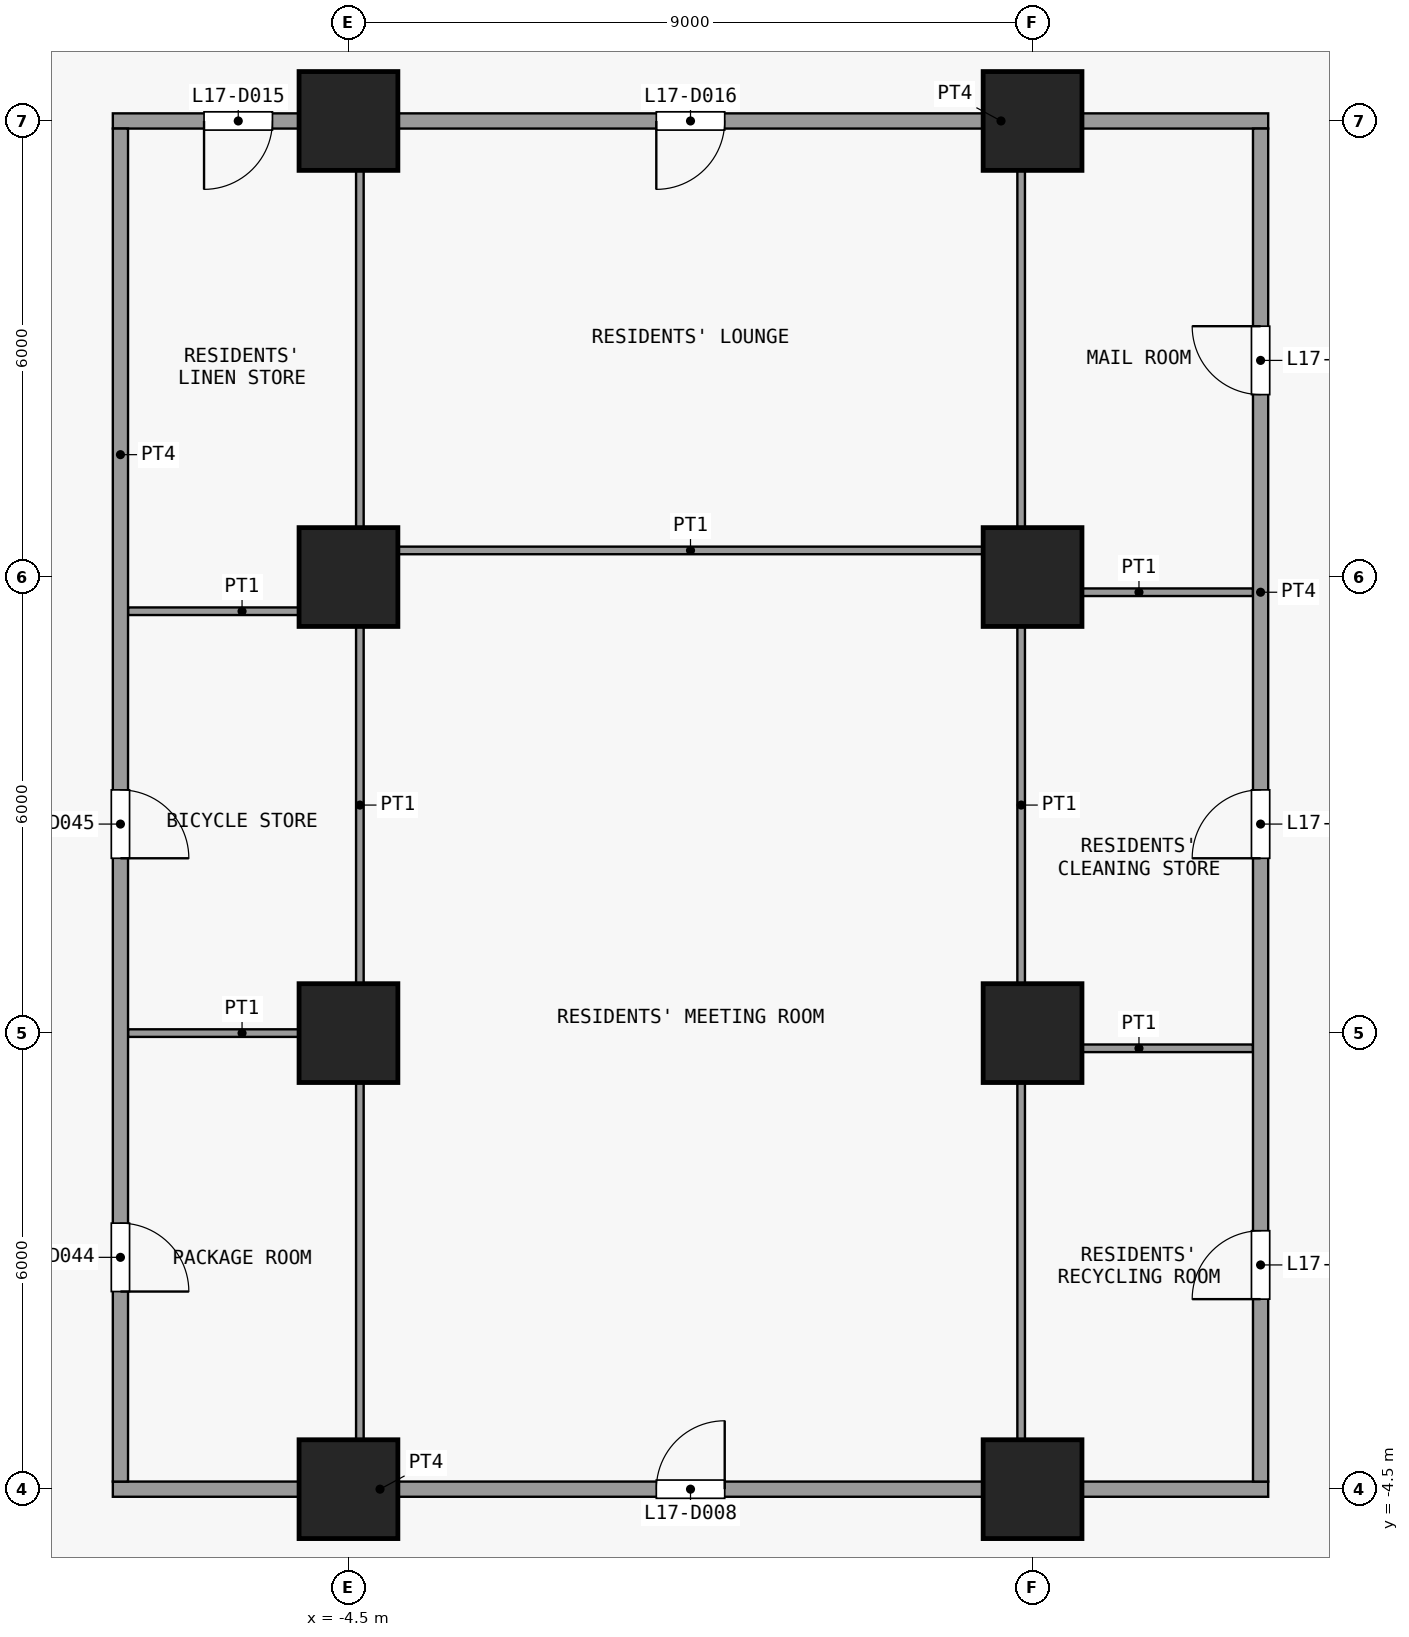
"""IFC4 building model, lengths in metres.
Left out: names, types, materials, properties, quantities, classifications, styles, units other than length and angle.
Written with IfcOpenShell. Run it as: python <this file> out.ifc"""

import sys

from ifc_helpers import new_model, si_unit, direction, frame, frame_2d, origin, origin_2d, place, context, subcontext, project, spatial, rectangle, extrude, element, fill, save


model = new_model("IFC4")
c1 = context("Model", 3, precision=1e-05, world=origin(), true_north=direction((0.0, 1.0)))
c2 = subcontext(c1, "Body", "Model", "MODEL_VIEW")
j1 = project(units=[si_unit("LENGTHUNIT", "METRE"), si_unit("PLANEANGLEUNIT", "RADIAN")], contexts=[c1])
p1 = place(None, origin())
s1 = spatial("IfcSite", under=j1, at=p1, CompositionType="ELEMENT")
p2 = place(p1, origin())
s2 = spatial("IfcBuilding", under=s1, at=p2, CompositionType="ELEMENT")
p3 = place(p2, frame((0.0, 0.0, 72.1)))
s3 = spatial("IfcBuildingStorey", under=s2, at=p3, CompositionType="ELEMENT", Elevation=72.1)
for number, where, z_axis, x_axis in (
    (1, (-4.5, -4.5, 0.0), (0.0, 0.0, 1.0), (1.0, 0.0, 0.0)),
    (2, (-4.5, 1.5, 0.0), (0.0, 0.0, 1.0), (1.0, 0.0, 0.0)),
    (3, (-4.5, 7.5, 0.0), (0.0, 0.0, 1.0), (1.0, 0.0, 0.0)),
    (4, (-4.5, 13.5, 0.0), (0.0, 0.0, 1.0), (1.0, 0.0, 0.0)),
    (5, (4.5, -4.5, 0.0), (0.0, 0.0, 1.0), (1.0, 0.0, 0.0)),
    (6, (4.5, 1.5, 0.0), (0.0, 0.0, 1.0), (1.0, 0.0, 0.0)),
    (7, (4.5, 7.5, 0.0), (0.0, 0.0, 1.0), (1.0, 0.0, 0.0)),
    (8, (4.5, 13.5, 0.0), (0.0, 0.0, 1.0), (1.0, 0.0, 0.0)),
):
    element("IfcColumn", number, at=place(p3, frame(where, z_axis=z_axis, x_axis=x_axis)), inside=s3, PredefinedType="COLUMN", context=c2, shape_type="SweptSolid", body=[
        extrude(rectangle(XDim=1.3, YDim=1.3, at=origin_2d()), origin(), (0.0, 0.0, 1.0), 3.6),
    ])
p4 = place(p3, frame((-7.6, -4.5, 0.0), z_axis=(0.0, 0.0, 1.0), x_axis=(1.0, 0.0, 0.0)))
e9 = element("IfcWall", 9, at=p4, inside=s3, PredefinedType="PARTITIONING", context=c2, shape_type="SweptSolid", body=[
    extrude(rectangle(XDim=15.2, YDim=0.2, at=frame_2d((7.6, 0.0))), origin(), (0.0, 0.0, 1.0), 3.15),
])
p5 = place(p4, frame((7.15, 0.0, 0.0)))
e10 = element("IfcOpeningElement", 10, at=p5, cuts=e9, PredefinedType="OPENING", context=c2, shape_type="SweptSolid", body=[
    extrude(rectangle(XDim=0.9, YDim=2.1, at=frame_2d((0.45, 1.05))), frame((0.0, 0.11, 0.0), z_axis=(0.0, -1.0, 0.0), x_axis=(1.0, 0.0, 0.0)), (0.0, 0.0, 1.0), 0.22),
])
for number, where, z_axis, x_axis in (
    (11, (4.4, 1.3, 0.0), (0.0, 0.0, 1.0), (1.0, 0.0, 0.0)),
    (12, (-7.4, 1.5, 0.0), (0.0, 0.0, 1.0), (1.0, 0.0, 0.0)),
    (13, (-7.4, 7.05, 0.0), (0.0, 0.0, 1.0), (1.0, 0.0, 0.0)),
    (14, (4.4, 7.3, 0.0), (0.0, 0.0, 1.0), (1.0, 0.0, 0.0)),
):
    element("IfcWall", number, at=place(p3, frame(where, z_axis=z_axis, x_axis=x_axis)), inside=s3, PredefinedType="PARTITIONING", context=c2, shape_type="SweptSolid", body=[
        extrude(rectangle(XDim=3.0, YDim=0.1, at=frame_2d((1.5, 0.0))), origin(), (0.0, 0.0, 1.0), 3.15),
    ])
p6 = place(p3, frame((-4.3, 7.85, 0.0), z_axis=(0.0, 0.0, 1.0), x_axis=(1.0, 0.0, 0.0)))
e15 = element("IfcWall", 15, at=p6, inside=s3, PredefinedType="PARTITIONING", context=c2, shape_type="SweptSolid", body=[
    extrude(rectangle(XDim=8.6, YDim=0.1, at=frame_2d((4.3, 0.0))), origin(), (0.0, 0.0, 1.0), 3.15),
])
p7 = place(p3, frame((-7.6, 13.5, 0.0), z_axis=(0.0, 0.0, 1.0), x_axis=(1.0, 0.0, 0.0)))
e16 = element("IfcWall", 16, at=p7, inside=s3, PredefinedType="PARTITIONING", context=c2, shape_type="SweptSolid", body=[
    extrude(rectangle(XDim=15.2, YDim=0.2, at=frame_2d((7.6, 0.0))), origin(), (0.0, 0.0, 1.0), 3.15),
])
p8 = place(p7, frame((1.2, 0.0, 0.0)))
e17 = element("IfcOpeningElement", 17, at=p8, cuts=e16, PredefinedType="OPENING", context=c2, shape_type="SweptSolid", body=[
    extrude(rectangle(XDim=0.9, YDim=2.1, at=frame_2d((0.45, 1.05))), frame((0.0, 0.11, 0.0), z_axis=(0.0, -1.0, 0.0), x_axis=(1.0, 0.0, 0.0)), (0.0, 0.0, 1.0), 0.22),
])
p9 = place(p7, frame((7.15, 0.0, 0.0)))
e18 = element("IfcOpeningElement", 18, at=p9, cuts=e16, PredefinedType="OPENING", context=c2, shape_type="SweptSolid", body=[
    extrude(rectangle(XDim=0.9, YDim=2.1, at=frame_2d((0.45, 1.05))), frame((0.0, 0.11, 0.0), z_axis=(0.0, -1.0, 0.0), x_axis=(1.0, 0.0, 0.0)), (0.0, 0.0, 1.0), 0.22),
])
p10 = place(p3, frame((-7.5, -4.4, 0.0), z_axis=(0.0, 0.0, 1.0), x_axis=(0.0, 1.0, 0.0)))
e19 = element("IfcWall", 19, at=p10, inside=s3, PredefinedType="PARTITIONING", context=c2, shape_type="SweptSolid", body=[
    extrude(rectangle(XDim=17.8, YDim=0.2, at=frame_2d((8.9, 0.0))), origin(), (0.0, 0.0, 1.0), 3.15),
])
p11 = place(p10, frame((2.5, 0.0, 0.0)))
e20 = element("IfcOpeningElement", 20, at=p11, cuts=e19, PredefinedType="OPENING", context=c2, shape_type="SweptSolid", body=[
    extrude(rectangle(XDim=0.9, YDim=2.1, at=frame_2d((0.45, 1.05))), frame((0.0, 0.11, 0.0), z_axis=(0.0, -1.0, 0.0), x_axis=(1.0, 0.0, 0.0)), (0.0, 0.0, 1.0), 0.22),
])
p12 = place(p10, frame((8.2, 0.0, 0.0)))
e21 = element("IfcOpeningElement", 21, at=p12, cuts=e19, PredefinedType="OPENING", context=c2, shape_type="SweptSolid", body=[
    extrude(rectangle(XDim=0.9, YDim=2.1, at=frame_2d((0.45, 1.05))), frame((0.0, 0.11, 0.0), z_axis=(0.0, -1.0, 0.0), x_axis=(1.0, 0.0, 0.0)), (0.0, 0.0, 1.0), 0.22),
])
for number, where, z_axis, x_axis in (
    (22, (-4.35, -4.4, 0.0), (0.0, 0.0, 1.0), (0.0, 1.0, 0.0)),
    (23, (4.35, -4.4, 0.0), (0.0, 0.0, 1.0), (0.0, 1.0, 0.0)),
):
    element("IfcWall", number, at=place(p3, frame(where, z_axis=z_axis, x_axis=x_axis)), inside=s3, PredefinedType="PARTITIONING", context=c2, shape_type="SweptSolid", body=[
        extrude(rectangle(XDim=17.8, YDim=0.1, at=frame_2d((8.9, 0.0))), origin(), (0.0, 0.0, 1.0), 3.15),
    ])
p13 = place(p3, frame((7.5, -4.4, 0.0), z_axis=(0.0, 0.0, 1.0), x_axis=(0.0, 1.0, 0.0)))
e24 = element("IfcWall", 24, at=p13, inside=s3, PredefinedType="PARTITIONING", context=c2, shape_type="SweptSolid", body=[
    extrude(rectangle(XDim=17.8, YDim=0.2, at=frame_2d((8.9, 0.0))), origin(), (0.0, 0.0, 1.0), 3.15),
])
p14 = place(p13, frame((2.4, 0.0, 0.0)))
e25 = element("IfcOpeningElement", 25, at=p14, cuts=e24, PredefinedType="OPENING", context=c2, shape_type="SweptSolid", body=[
    extrude(rectangle(XDim=0.9, YDim=2.1, at=frame_2d((0.45, 1.05))), frame((0.0, 0.11, 0.0), z_axis=(0.0, -1.0, 0.0), x_axis=(1.0, 0.0, 0.0)), (0.0, 0.0, 1.0), 0.22),
])
p15 = place(p13, frame((8.2, 0.0, 0.0)))
e26 = element("IfcOpeningElement", 26, at=p15, cuts=e24, PredefinedType="OPENING", context=c2, shape_type="SweptSolid", body=[
    extrude(rectangle(XDim=0.9, YDim=2.1, at=frame_2d((0.45, 1.05))), frame((0.0, 0.11, 0.0), z_axis=(0.0, -1.0, 0.0), x_axis=(1.0, 0.0, 0.0)), (0.0, 0.0, 1.0), 0.22),
])
p16 = place(p13, frame((14.3, 0.0, 0.0)))
e27 = element("IfcOpeningElement", 27, at=p16, cuts=e24, PredefinedType="OPENING", context=c2, shape_type="SweptSolid", body=[
    extrude(rectangle(XDim=0.9, YDim=2.1, at=frame_2d((0.45, 1.05))), frame((0.0, 0.11, 0.0), z_axis=(0.0, -1.0, 0.0), x_axis=(1.0, 0.0, 0.0)), (0.0, 0.0, 1.0), 0.22),
])
p17 = place(p5, origin())
e28 = element("IfcDoor", 28, at=p17, inside=s3, OperationType="SINGLE_SWING_LEFT", PredefinedType="DOOR", context=c2, shape_type="SweptSolid", body=[
    extrude(rectangle(XDim=0.9, YDim=2.1, at=frame_2d((0.45, 1.05))), frame((0.0, 0.025, 0.0), z_axis=(0.0, -1.0, 0.0), x_axis=(1.0, 0.0, 0.0)), (0.0, 0.0, 1.0), 0.05),
])
fill(e10, e28)
p18 = place(p8, origin())
e29 = element("IfcDoor", 29, at=p18, inside=s3, OperationType="SINGLE_SWING_LEFT", PredefinedType="DOOR", context=c2, shape_type="SweptSolid", body=[
    extrude(rectangle(XDim=0.9, YDim=2.1, at=frame_2d((0.45, 1.05))), frame((0.0, 0.025, 0.0), z_axis=(0.0, -1.0, 0.0), x_axis=(1.0, 0.0, 0.0)), (0.0, 0.0, 1.0), 0.05),
])
fill(e17, e29)
p19 = place(p9, origin())
e30 = element("IfcDoor", 30, at=p19, inside=s3, OperationType="SINGLE_SWING_LEFT", PredefinedType="DOOR", context=c2, shape_type="SweptSolid", body=[
    extrude(rectangle(XDim=0.9, YDim=2.1, at=frame_2d((0.45, 1.05))), frame((0.0, 0.025, 0.0), z_axis=(0.0, -1.0, 0.0), x_axis=(1.0, 0.0, 0.0)), (0.0, 0.0, 1.0), 0.05),
])
fill(e18, e30)
p20 = place(p11, origin())
e31 = element("IfcDoor", 31, at=p20, inside=s3, OperationType="SINGLE_SWING_LEFT", PredefinedType="DOOR", context=c2, shape_type="SweptSolid", body=[
    extrude(rectangle(XDim=0.9, YDim=2.1, at=frame_2d((0.45, 1.05))), frame((0.0, 0.025, 0.0), z_axis=(0.0, -1.0, 0.0), x_axis=(1.0, 0.0, 0.0)), (0.0, 0.0, 1.0), 0.05),
])
fill(e20, e31)
p21 = place(p12, origin())
e32 = element("IfcDoor", 32, at=p21, inside=s3, OperationType="SINGLE_SWING_LEFT", PredefinedType="DOOR", context=c2, shape_type="SweptSolid", body=[
    extrude(rectangle(XDim=0.9, YDim=2.1, at=frame_2d((0.45, 1.05))), frame((0.0, 0.025, 0.0), z_axis=(0.0, -1.0, 0.0), x_axis=(1.0, 0.0, 0.0)), (0.0, 0.0, 1.0), 0.05),
])
fill(e21, e32)
p22 = place(p14, origin())
e33 = element("IfcDoor", 33, at=p22, inside=s3, OperationType="SINGLE_SWING_RIGHT", PredefinedType="DOOR", context=c2, shape_type="SweptSolid", body=[
    extrude(rectangle(XDim=0.9, YDim=2.1, at=frame_2d((0.45, 1.05))), frame((0.0, 0.025, 0.0), z_axis=(0.0, -1.0, 0.0), x_axis=(1.0, 0.0, 0.0)), (0.0, 0.0, 1.0), 0.05),
])
fill(e25, e33)
p23 = place(p15, origin())
e34 = element("IfcDoor", 34, at=p23, inside=s3, OperationType="SINGLE_SWING_RIGHT", PredefinedType="DOOR", context=c2, shape_type="SweptSolid", body=[
    extrude(rectangle(XDim=0.9, YDim=2.1, at=frame_2d((0.45, 1.05))), frame((0.0, 0.025, 0.0), z_axis=(0.0, -1.0, 0.0), x_axis=(1.0, 0.0, 0.0)), (0.0, 0.0, 1.0), 0.05),
])
fill(e26, e34)
p24 = place(p16, origin())
e35 = element("IfcDoor", 35, at=p24, inside=s3, OperationType="SINGLE_SWING_LEFT", PredefinedType="DOOR", context=c2, shape_type="SweptSolid", body=[
    extrude(rectangle(XDim=0.9, YDim=2.1, at=frame_2d((0.45, 1.05))), frame((0.0, 0.025, 0.0), z_axis=(0.0, -1.0, 0.0), x_axis=(1.0, 0.0, 0.0)), (0.0, 0.0, 1.0), 0.05),
])
fill(e27, e35)
save(model, sys.argv[1])
